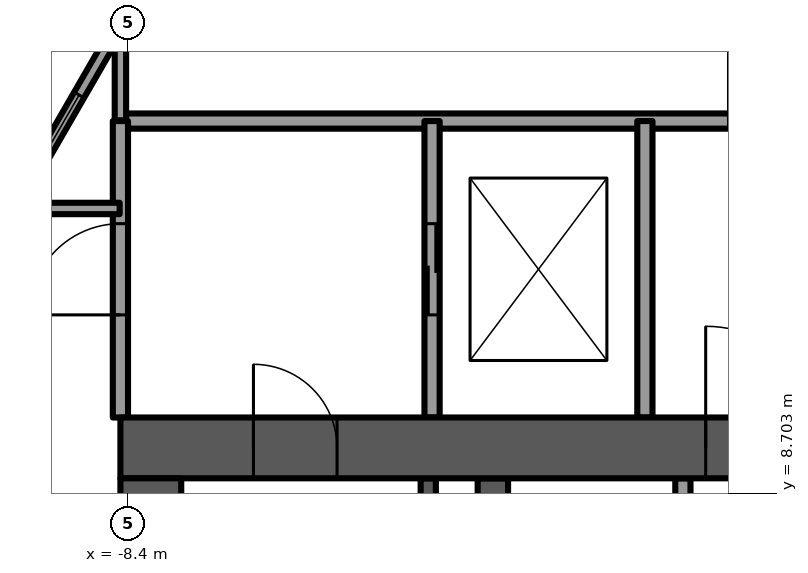
"""IFC4 building model, lengths in metres.
Left out: names, types, materials, properties, quantities, classifications, styles, units other than length and angle.
Written with IfcOpenShell. Run it as: python <this file> out.ifc"""

import sys

from ifc_helpers import new_model, si_unit, direction, frame, frame_2d, origin, place, context, subcontext, project, spatial, rectangle, extrude, element, fill, save


model = new_model("IFC4")
c1 = context("Model", 3, precision=1e-05, world=origin(), true_north=direction((0.0, 1.0)))
c2 = subcontext(c1, "Body", "Model", "MODEL_VIEW")
j1 = project(units=[si_unit("LENGTHUNIT", "METRE"), si_unit("PLANEANGLEUNIT", "RADIAN")], contexts=[c1])
p1 = place(None, origin())
s1 = spatial("IfcSite", under=j1, at=p1, CompositionType="ELEMENT")
p2 = place(p1, origin())
s2 = spatial("IfcBuilding", under=s1, at=p2, CompositionType="ELEMENT")
p3 = place(p2, frame((0.0, 0.0, 179.5)))
s3 = spatial("IfcBuildingStorey", under=s2, at=p3, CompositionType="ELEMENT", Elevation=179.5)
p4 = place(p3, frame((-8.5, 9.3, -0.3), z_axis=(0.0, 0.0, 1.0), x_axis=(1.0, 0.0, 0.0)))
e1 = element("IfcWall", 1, at=p4, inside=s3, PredefinedType="SHEAR", context=c2, shape_type="SweptSolid", body=[
    extrude(rectangle(XDim=17.0, YDim=0.8, at=frame_2d((8.5, 0.0))), origin(), (0.0, 0.0, 1.0), 3.75),
])
p5 = place(p4, frame((7.7, 0.0, 0.0)))
e2 = element("IfcOpeningElement", 2, at=p5, cuts=e1, PredefinedType="OPENING", context=c2, shape_type="SweptSolid", body=[
    extrude(rectangle(XDim=1.6, YDim=2.1, at=frame_2d((0.8, 1.05))), frame((0.0, 0.4, 0.0), z_axis=(0.0, -1.0, 0.0), x_axis=(1.0, 0.0, 0.0)), (0.0, 0.0, 1.0), 0.8),
])
p6 = place(p4, frame((1.75, 0.0, 0.0)))
e3 = element("IfcOpeningElement", 3, at=p6, cuts=e1, PredefinedType="OPENING", context=c2, shape_type="SweptSolid", body=[
    extrude(rectangle(XDim=1.1, YDim=2.1, at=frame_2d((0.55, 1.05))), frame((0.0, 0.4, 0.0), z_axis=(0.0, -1.0, 0.0), x_axis=(1.0, 0.0, 0.0)), (0.0, 0.0, 1.0), 0.8),
])
p7 = place(p4, frame((14.15, 0.0, 0.0)))
e4 = element("IfcOpeningElement", 4, at=p7, cuts=e1, PredefinedType="OPENING", context=c2, shape_type="SweptSolid", body=[
    extrude(rectangle(XDim=1.1, YDim=2.1, at=frame_2d((0.55, 1.05))), frame((0.0, 0.4, 0.0), z_axis=(0.0, -1.0, 0.0), x_axis=(1.0, 0.0, 0.0)), (0.0, 0.0, 1.0), 0.8),
])
p8 = place(p3, frame((-8.1, -0.9, -0.3), z_axis=(0.0, 0.0, 1.0), x_axis=(0.0, 1.0, 0.0)))
e5 = element("IfcWall", 5, at=p8, inside=s3, PredefinedType="SHEAR", context=c2, shape_type="SweptSolid", body=[
    extrude(rectangle(XDim=9.8, YDim=0.8, at=frame_2d((4.9, 0.0))), origin(), (0.0, 0.0, 1.0), 3.75),
])
p9 = place(p8, frame((8.15, 0.0, 0.0)))
e6 = element("IfcOpeningElement", 6, at=p9, cuts=e5, PredefinedType="OPENING", context=c2, shape_type="SweptSolid", body=[
    extrude(rectangle(XDim=1.1, YDim=2.1, at=frame_2d((0.55, 1.05))), frame((0.0, 0.4, 0.0), z_axis=(0.0, -1.0, 0.0), x_axis=(1.0, 0.0, 0.0)), (0.0, 0.0, 1.0), 0.8),
])
p10 = place(p3, frame((-3.6, -0.9, -0.3), z_axis=(0.0, 0.0, 1.0), x_axis=(0.0, 1.0, 0.0)))
e7 = element("IfcWall", 7, at=p10, inside=s3, PredefinedType="SHEAR", context=c2, shape_type="SweptSolid", body=[
    extrude(rectangle(XDim=9.8, YDim=0.4, at=frame_2d((4.9, 0.0))), origin(), (0.0, 0.0, 1.0), 3.75),
])
p11 = place(p3, frame((-7.109, 17.292, 0.0), z_axis=(0.0, 0.0, 1.0), x_axis=(-0.499999728453, -0.866025560562, 0.0)))
e8 = element("IfcWall", 8, at=p11, inside=s3, PredefinedType="SOLIDWALL", context=c2, shape_type="SweptSolid", body=[
    extrude(rectangle(XDim=20.071, YDim=0.15, at=frame_2d((10.035, 0.0))), origin(), (0.0, 0.0, 1.0), 3.45),
])
p12 = place(p11, frame((3.868, 0.0, 0.15)))
e9 = element("IfcOpeningElement", 9, at=p12, cuts=e8, PredefinedType="OPENING", context=c2, shape_type="SweptSolid", body=[
    extrude(rectangle(XDim=1.4, YDim=2.85, at=frame_2d((0.7, 1.425))), frame((0.0, 0.075, 0.0), z_axis=(0.0, -1.0, 0.0), x_axis=(1.0, 0.0, 0.0)), (0.0, 0.0, 1.0), 0.15),
])
p13 = place(p11, frame((7.521, 0.0, 0.15)))
e10 = element("IfcOpeningElement", 10, at=p13, cuts=e8, PredefinedType="OPENING", context=c2, shape_type="SweptSolid", body=[
    extrude(rectangle(XDim=1.6, YDim=2.85, at=frame_2d((0.8, 1.425))), frame((0.0, 0.075, 0.0), z_axis=(0.0, -1.0, 0.0), x_axis=(1.0, 0.0, 0.0)), (0.0, 0.0, 1.0), 0.15),
])
p14 = place(p11, frame((9.721, 0.0, 0.15)))
e11 = element("IfcOpeningElement", 11, at=p14, cuts=e8, PredefinedType="OPENING", context=c2, shape_type="SweptSolid", body=[
    extrude(rectangle(XDim=1.4, YDim=2.85, at=frame_2d((0.7, 1.425))), frame((0.0, 0.075, 0.0), z_axis=(0.0, -1.0, 0.0), x_axis=(1.0, 0.0, 0.0)), (0.0, 0.0, 1.0), 0.15),
])
p15 = place(p11, frame((11.721, 0.0, 0.15)))
e12 = element("IfcOpeningElement", 12, at=p15, cuts=e8, PredefinedType="OPENING", context=c2, shape_type="SweptSolid", body=[
    extrude(rectangle(XDim=1.6, YDim=2.85, at=frame_2d((0.8, 1.425))), frame((0.0, 0.075, 0.0), z_axis=(0.0, -1.0, 0.0), x_axis=(1.0, 0.0, 0.0)), (0.0, 0.0, 1.0), 0.15),
])
p16 = place(p11, frame((13.921, 0.0, 0.15)))
e13 = element("IfcOpeningElement", 13, at=p16, cuts=e8, PredefinedType="OPENING", context=c2, shape_type="SweptSolid", body=[
    extrude(rectangle(XDim=1.4, YDim=2.85, at=frame_2d((0.7, 1.425))), frame((0.0, 0.075, 0.0), z_axis=(0.0, -1.0, 0.0), x_axis=(1.0, 0.0, 0.0)), (0.0, 0.0, 1.0), 0.15),
])
p17 = place(p11, frame((18.121, 0.0, 0.0)))
e14 = element("IfcOpeningElement", 14, at=p17, cuts=e8, PredefinedType="OPENING", context=c2, shape_type="SweptSolid", body=[
    extrude(rectangle(XDim=1.4, YDim=2.4, at=frame_2d((0.7, 1.2))), frame((0.0, 0.075, 0.0), z_axis=(0.0, -1.0, 0.0), x_axis=(1.0, 0.0, 0.0)), (0.0, 0.0, 1.0), 0.15),
])
p18 = place(p11, frame((0.452, 0.0, 0.15)))
e15 = element("IfcOpeningElement", 15, at=p18, cuts=e8, PredefinedType="OPENING", context=c2, shape_type="SweptSolid", body=[
    extrude(rectangle(XDim=1.6, YDim=2.73, at=frame_2d((0.8, 1.365))), frame((0.0, 0.075, 0.0), z_axis=(0.0, -1.0, 0.0), x_axis=(1.0, 0.0, 0.0)), (0.0, 0.0, 1.0), 0.15),
])
p19 = place(p3, frame((-1.1, 6.0, 0.0), z_axis=(0.0, 0.0, 1.0), x_axis=(0.0, 1.0, 0.0)))
e16 = element("IfcWall", 16, at=p19, inside=s3, PredefinedType="PARTITIONING", context=c2, shape_type="SweptSolid", body=[
    extrude(rectangle(XDim=2.9, YDim=0.2, at=frame_2d((1.45, 0.0))), origin(), (0.0, 0.0, 1.0), 3.45),
])
p20 = place(p3, frame((-4.45, 0.9, -0.3), z_axis=(0.0, 0.0, 1.0), x_axis=(0.0, 1.0, 0.0)))
e17 = element("IfcWall", 17, at=p20, inside=s3, PredefinedType="SOLIDWALL", context=c2, shape_type="SweptSolid", body=[
    extrude(rectangle(XDim=8.0, YDim=0.2, at=frame_2d((4.0, 0.0))), origin(), (0.0, 0.0, 1.0), 3.75),
])
p21 = place(p3, frame((-8.5, 13.6, 0.0), z_axis=(0.0, 0.0, 1.0), x_axis=(1.0, 0.0, 0.0)))
e18 = element("IfcWall", 18, at=p21, inside=s3, PredefinedType="PARTITIONING", context=c2, shape_type="SweptSolid", body=[
    extrude(rectangle(XDim=17.0, YDim=0.2, at=frame_2d((8.5, 0.0))), origin(), (0.0, 0.0, 1.0), 3.45),
])
p22 = place(p21, frame((8.0, 0.0, 0.0)))
e19 = element("IfcOpeningElement", 19, at=p22, cuts=e18, PredefinedType="OPENING", context=c2, shape_type="SweptSolid", body=[
    extrude(rectangle(XDim=1.0, YDim=2.1, at=frame_2d((0.5, 1.05))), frame((0.0, 0.1, 0.0), z_axis=(0.0, -1.0, 0.0), x_axis=(1.0, 0.0, 0.0)), (0.0, 0.0, 1.0), 0.2),
])
p23 = place(p3, frame((-8.5, 9.7, 0.0), z_axis=(0.0, 0.0, 1.0), x_axis=(0.0, 1.0, 0.0)))
e20 = element("IfcWall", 20, at=p23, inside=s3, PredefinedType="PARTITIONING", context=c2, shape_type="SweptSolid", body=[
    extrude(rectangle(XDim=3.9, YDim=0.2, at=frame_2d((1.95, 0.0))), origin(), (0.0, 0.0, 1.0), 3.45),
])
p24 = place(p23, frame((1.35, 0.0, 0.0)))
e21 = element("IfcOpeningElement", 21, at=p24, cuts=e20, PredefinedType="OPENING", context=c2, shape_type="SweptSolid", body=[
    extrude(rectangle(XDim=1.2, YDim=2.1, at=frame_2d((0.6, 1.05))), frame((0.0, 0.1, 0.0), z_axis=(0.0, -1.0, 0.0), x_axis=(1.0, 0.0, 0.0)), (0.0, 0.0, 1.0), 0.2),
])
p25 = place(p3, frame((-4.4, 9.7, 0.0), z_axis=(0.0, 0.0, 1.0), x_axis=(0.0, 1.0, 0.0)))
e22 = element("IfcWall", 22, at=p25, inside=s3, PredefinedType="PARTITIONING", context=c2, shape_type="SweptSolid", body=[
    extrude(rectangle(XDim=3.9, YDim=0.2, at=frame_2d((1.95, 0.0))), origin(), (0.0, 0.0, 1.0), 3.45),
])
p26 = place(p25, frame((1.35, 0.0, 0.0)))
e23 = element("IfcOpeningElement", 23, at=p26, cuts=e22, PredefinedType="OPENING", context=c2, shape_type="SweptSolid", body=[
    extrude(rectangle(XDim=1.2, YDim=2.1, at=frame_2d((0.6, 1.05))), frame((0.0, 0.1, 0.0), z_axis=(0.0, -1.0, 0.0), x_axis=(1.0, 0.0, 0.0)), (0.0, 0.0, 1.0), 0.2),
])
p27 = place(p3, frame((-1.6, 9.7, 0.0), z_axis=(0.0, 0.0, 1.0), x_axis=(0.0, 1.0, 0.0)))
e24 = element("IfcWall", 24, at=p27, inside=s3, PredefinedType="PARTITIONING", context=c2, shape_type="SweptSolid", body=[
    extrude(rectangle(XDim=3.9, YDim=0.2, at=frame_2d((1.95, 0.0))), origin(), (0.0, 0.0, 1.0), 3.45),
])
p28 = place(p3, frame((-9.957, 12.45, 0.0), z_axis=(0.0, 0.0, 1.0), x_axis=(1.0, 0.0, 0.0)))
e25 = element("IfcWall", 25, at=p28, inside=s3, PredefinedType="PARTITIONING", context=c2, shape_type="SweptSolid", body=[
    extrude(rectangle(XDim=1.447, YDim=0.15, at=frame_2d((0.724, 0.0))), origin(), (0.0, 0.0, 1.0), 3.45),
])
p29 = place(p3, frame((-8.5, 13.61, 0.0), z_axis=(0.0, 0.0, 1.0), x_axis=(0.0, 1.0, 0.0)))
e26 = element("IfcWall", 26, at=p29, inside=s3, PredefinedType="PARTITIONING", context=c2, shape_type="SweptSolid", body=[
    extrude(rectangle(XDim=1.364, YDim=0.15, at=frame_2d((0.682, 0.0))), origin(), (0.0, 0.0, 1.0), 3.45),
])
p30 = place(p12, origin())
e27 = element("IfcWindow", 27, at=p30, inside=s3, PartitioningType="SINGLE_PANEL", PredefinedType="WINDOW", context=c2, shape_type="SweptSolid", body=[
    extrude(rectangle(XDim=1.4, YDim=2.85, at=frame_2d((0.7, 1.425))), frame((0.0, 0.03, 0.0), z_axis=(0.0, -1.0, 0.0), x_axis=(1.0, 0.0, 0.0)), (0.0, 0.0, 1.0), 0.06),
])
fill(e9, e27)
p31 = place(p5, origin())
e28 = element("IfcDoor", 28, at=p31, inside=s3, OperationType="DOUBLE_DOOR_SINGLE_SWING", PredefinedType="DOOR", context=c2, shape_type="SweptSolid", body=[
    extrude(rectangle(XDim=1.6, YDim=2.1, at=frame_2d((0.8, 1.05))), frame((0.0, 0.025, 0.0), z_axis=(0.0, -1.0, 0.0), x_axis=(1.0, 0.0, 0.0)), (0.0, 0.0, 1.0), 0.05),
])
fill(e2, e28)
p32 = place(p6, origin())
e29 = element("IfcDoor", 29, at=p32, inside=s3, OperationType="SINGLE_SWING_LEFT", PredefinedType="DOOR", context=c2, shape_type="SweptSolid", body=[
    extrude(rectangle(XDim=1.1, YDim=2.1, at=frame_2d((0.55, 1.05))), frame((0.0, 0.025, 0.0), z_axis=(0.0, -1.0, 0.0), x_axis=(1.0, 0.0, 0.0)), (0.0, 0.0, 1.0), 0.05),
])
fill(e3, e29)
p33 = place(p26, origin())
e30 = element("IfcDoor", 30, at=p33, inside=s3, OperationType="SLIDING_TO_LEFT", PredefinedType="DOOR", context=c2, shape_type="SweptSolid", body=[
    extrude(rectangle(XDim=1.2, YDim=2.1, at=frame_2d((0.6, 1.05))), frame((0.0, 0.025, 0.0), z_axis=(0.0, -1.0, 0.0), x_axis=(1.0, 0.0, 0.0)), (0.0, 0.0, 1.0), 0.05),
])
fill(e23, e30)
p34 = place(p24, origin())
e31 = element("IfcDoor", 31, at=p34, inside=s3, OperationType="SINGLE_SWING_LEFT", PredefinedType="DOOR", context=c2, shape_type="SweptSolid", body=[
    extrude(rectangle(XDim=1.2, YDim=2.1, at=frame_2d((0.6, 1.05))), frame((0.0, 0.025, 0.0), z_axis=(0.0, -1.0, 0.0), x_axis=(1.0, 0.0, 0.0)), (0.0, 0.0, 1.0), 0.05),
])
fill(e21, e31)
save(model, sys.argv[1])
